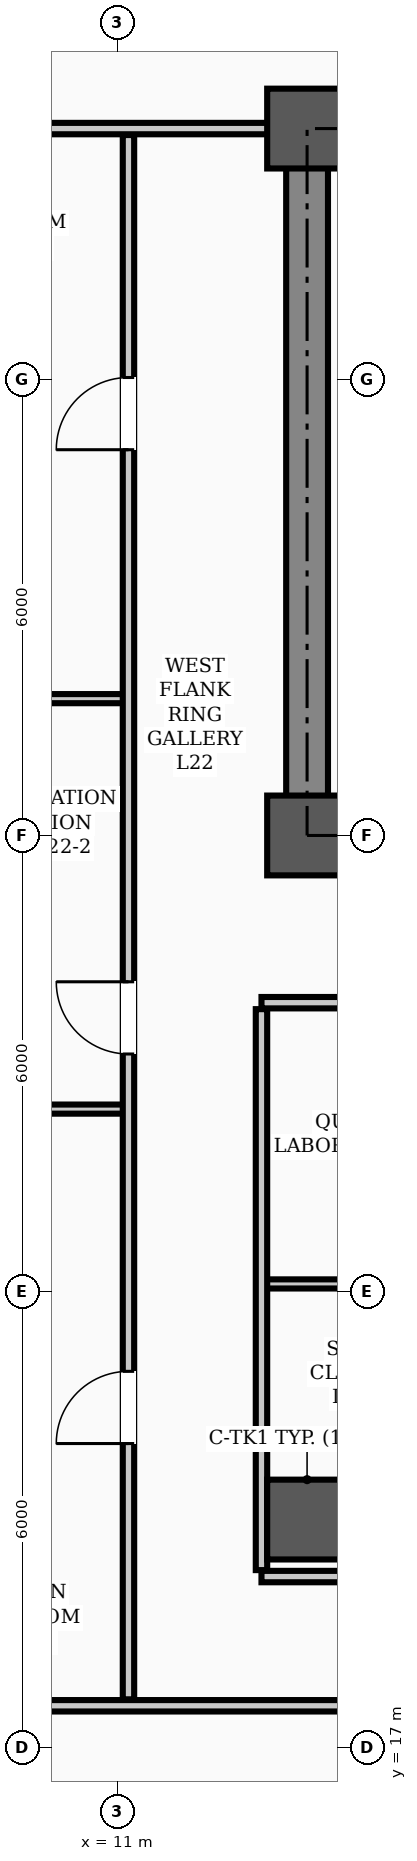
"""IFC4 building model, lengths in metres.
Left out: names, types, materials, properties, quantities, classifications, styles, units other than length and angle.
Written with IfcOpenShell. Run it as: python <this file> out.ifc"""

import sys

from ifc_helpers import new_model, si_unit, direction, frame, frame_2d, origin, origin_2d, place, context, subcontext, project, spatial, rectangle, hollow_rectangle, extrude, element, fill, save


model = new_model("IFC4")
c1 = context("Model", 3, precision=1e-05, world=origin(), true_north=direction((0.0, 1.0)))
c2 = subcontext(c1, "Body", "Model", "MODEL_VIEW")
j1 = project(units=[si_unit("LENGTHUNIT", "METRE"), si_unit("PLANEANGLEUNIT", "RADIAN")], contexts=[c1])
p1 = place(None, origin())
s1 = spatial("IfcSite", under=j1, at=p1, CompositionType="ELEMENT")
p2 = place(p1, origin())
s2 = spatial("IfcBuilding", under=s1, at=p2, CompositionType="ELEMENT")
p3 = place(p2, frame((0.0, 0.0, 88.9)))
s3 = spatial("IfcBuildingStorey", under=s2, at=p3, CompositionType="ELEMENT", Elevation=88.9)
for number, where, z_axis, x_axis in (
    (1, (13.5, 29.0, 0.0), (0.0, 0.0, 1.0), (1.0, 0.0, 0.0)),
    (2, (13.5, 38.3, 0.0), (0.0, 0.0, 1.0), (1.0, 0.0, 0.0)),
    (3, (13.5, 20.0, 0.0), (0.0, 0.0, 1.0), (1.0, 0.0, 0.0)),
):
    element("IfcColumn", number, at=place(p3, frame(where, z_axis=z_axis, x_axis=x_axis)), inside=s3, PredefinedType="COLUMN", context=c2, shape_type="SweptSolid", body=[
        extrude(hollow_rectangle(XDim=1.05, YDim=1.05, WallThickness=0.038, InnerFilletRadius=0.019, OuterFilletRadius=0.057, at=origin_2d()), origin(), (0.0, 0.0, 1.0), 3.9),
    ])
p4 = place(p3, frame((13.5, 29.0, 0.0), z_axis=(0.0, 0.0, 1.0), x_axis=(1.0, 0.0, 0.0)))
e4 = element("IfcWall", 4, at=p4, inside=s3, PredefinedType="SHEAR", context=c2, shape_type="SweptSolid", body=[
    extrude(rectangle(XDim=30.5, YDim=0.55, at=frame_2d((15.25, 0.0))), origin(), (0.0, 0.0, 1.0), 3.72),
])
p5 = place(p4, frame((1.75, 0.0, 0.0)))
e5 = element("IfcOpeningElement", 5, at=p5, cuts=e4, PredefinedType="OPENING", context=c2, shape_type="SweptSolid", body=[
    extrude(rectangle(XDim=1.1, YDim=2.08, at=frame_2d((0.55, 1.04))), frame((0.0, 0.285, 0.0), z_axis=(0.0, -1.0, 0.0), x_axis=(1.0, 0.0, 0.0)), (0.0, 0.0, 1.0), 0.57),
])
p6 = place(p4, frame((26.7, 0.0, 0.0)))
e6 = element("IfcOpeningElement", 6, at=p6, cuts=e4, PredefinedType="OPENING", context=c2, shape_type="SweptSolid", body=[
    extrude(rectangle(XDim=1.1, YDim=2.08, at=frame_2d((0.55, 1.04))), frame((0.0, 0.285, 0.0), z_axis=(0.0, -1.0, 0.0), x_axis=(1.0, 0.0, 0.0)), (0.0, 0.0, 1.0), 0.57),
])
p7 = place(p4, frame((6.8, 0.0, 0.0)))
e7 = element("IfcOpeningElement", 7, at=p7, cuts=e4, PredefinedType="OPENING", context=c2, shape_type="SweptSolid", body=[
    extrude(rectangle(XDim=1.1, YDim=2.08, at=frame_2d((0.55, 1.04))), frame((0.0, 0.285, 0.0), z_axis=(0.0, -1.0, 0.0), x_axis=(1.0, 0.0, 0.0)), (0.0, 0.0, 1.0), 0.57),
])
p8 = place(p4, frame((13.2, 0.0, 0.0)))
e8 = element("IfcOpeningElement", 8, at=p8, cuts=e4, PredefinedType="OPENING", context=c2, shape_type="SweptSolid", body=[
    extrude(rectangle(XDim=1.6, YDim=2.08, at=frame_2d((0.8, 1.04))), frame((0.0, 0.285, 0.0), z_axis=(0.0, -1.0, 0.0), x_axis=(1.0, 0.0, 0.0)), (0.0, 0.0, 1.0), 0.57),
])
p9 = place(p4, frame((20.525, 0.0, 0.0)))
e9 = element("IfcOpeningElement", 9, at=p9, cuts=e4, PredefinedType="OPENING", context=c2, shape_type="SweptSolid", body=[
    extrude(rectangle(XDim=0.95, YDim=2.08, at=frame_2d((0.475, 1.04))), frame((0.0, 0.285, 0.0), z_axis=(0.0, -1.0, 0.0), x_axis=(1.0, 0.0, 0.0)), (0.0, 0.0, 1.0), 0.57),
])
p10 = place(p3, frame((13.5, 38.3, 0.0), z_axis=(0.0, 0.0, 1.0), x_axis=(1.0, 0.0, 0.0)))
e10 = element("IfcWall", 10, at=p10, inside=s3, PredefinedType="SHEAR", context=c2, shape_type="SweptSolid", body=[
    extrude(rectangle(XDim=30.5, YDim=0.55, at=frame_2d((15.25, 0.0))), origin(), (0.0, 0.0, 1.0), 3.72),
])
p11 = place(p3, frame((13.5, 29.35, 0.0), z_axis=(0.0, 0.0, 1.0), x_axis=(0.0, 1.0, 0.0)))
e11 = element("IfcWall", 11, at=p11, inside=s3, PredefinedType="SHEAR", context=c2, shape_type="SweptSolid", body=[
    extrude(rectangle(XDim=8.6, YDim=0.55, at=frame_2d((4.3, 0.0))), origin(), (0.0, 0.0, 1.0), 3.72),
])
p12 = place(p3, frame((12.9, 26.8, 0.0), z_axis=(0.0, 0.0, 1.0), x_axis=(1.0, 0.0, 0.0)))
e12 = element("IfcWall", 12, at=p12, inside=s3, PredefinedType="PARTITIONING", context=c2, shape_type="SweptSolid", body=[
    extrude(rectangle(XDim=31.7, YDim=0.15, at=frame_2d((15.85, 0.0))), origin(), (0.0, 0.0, 1.0), 3.1),
])
p13 = place(p12, frame((13.6, 0.0, 0.0)))
e13 = element("IfcOpeningElement", 13, at=p13, cuts=e12, PredefinedType="OPENING", context=c2, shape_type="SweptSolid", body=[
    extrude(rectangle(XDim=1.6, YDim=2.08, at=frame_2d((0.8, 1.04))), frame((0.0, 0.085, 0.0), z_axis=(0.0, -1.0, 0.0), x_axis=(1.0, 0.0, 0.0)), (0.0, 0.0, 1.0), 0.17),
])
p14 = place(p12, frame((3.275, 0.0, 0.0)))
e14 = element("IfcOpeningElement", 14, at=p14, cuts=e12, PredefinedType="OPENING", context=c2, shape_type="SweptSolid", body=[
    extrude(rectangle(XDim=0.95, YDim=2.08, at=frame_2d((0.475, 1.04))), frame((0.0, 0.085, 0.0), z_axis=(0.0, -1.0, 0.0), x_axis=(1.0, 0.0, 0.0)), (0.0, 0.0, 1.0), 0.17),
])
p15 = place(p12, frame((9.025, 0.0, 0.0)))
e15 = element("IfcOpeningElement", 15, at=p15, cuts=e12, PredefinedType="OPENING", context=c2, shape_type="SweptSolid", body=[
    extrude(rectangle(XDim=0.95, YDim=2.08, at=frame_2d((0.475, 1.04))), frame((0.0, 0.085, 0.0), z_axis=(0.0, -1.0, 0.0), x_axis=(1.0, 0.0, 0.0)), (0.0, 0.0, 1.0), 0.17),
])
p16 = place(p12, frame((19.525, 0.0, 0.0)))
e16 = element("IfcOpeningElement", 16, at=p16, cuts=e12, PredefinedType="OPENING", context=c2, shape_type="SweptSolid", body=[
    extrude(rectangle(XDim=0.95, YDim=2.08, at=frame_2d((0.475, 1.04))), frame((0.0, 0.085, 0.0), z_axis=(0.0, -1.0, 0.0), x_axis=(1.0, 0.0, 0.0)), (0.0, 0.0, 1.0), 0.17),
])
p17 = place(p12, frame((26.725, 0.0, 0.0)))
e17 = element("IfcOpeningElement", 17, at=p17, cuts=e12, PredefinedType="OPENING", context=c2, shape_type="SweptSolid", body=[
    extrude(rectangle(XDim=0.95, YDim=2.08, at=frame_2d((0.475, 1.04))), frame((0.0, 0.085, 0.0), z_axis=(0.0, -1.0, 0.0), x_axis=(1.0, 0.0, 0.0)), (0.0, 0.0, 1.0), 0.17),
])
p18 = place(p3, frame((7.81, 17.55, 0.0), z_axis=(0.0, 0.0, 1.0), x_axis=(1.0, 0.0, 0.0)))
e18 = element("IfcWall", 18, at=p18, inside=s3, PredefinedType="PARTITIONING", context=c2, shape_type="SweptSolid", body=[
    extrude(rectangle(XDim=49.38, YDim=0.15, at=frame_2d((24.69, 0.0))), origin(), (0.0, 0.0, 1.0), 3.1),
])
p19 = place(p18, frame((7.465, 0.0, 0.0)))
e19 = element("IfcOpeningElement", 19, at=p19, cuts=e18, PredefinedType="OPENING", context=c2, shape_type="SweptSolid", body=[
    extrude(rectangle(XDim=0.95, YDim=2.08, at=frame_2d((0.475, 1.04))), frame((0.0, 0.085, 0.0), z_axis=(0.0, -1.0, 0.0), x_axis=(1.0, 0.0, 0.0)), (0.0, 0.0, 1.0), 0.17),
])
p20 = place(p18, frame((11.915, 0.0, 0.0)))
e20 = element("IfcOpeningElement", 20, at=p20, cuts=e18, PredefinedType="OPENING", context=c2, shape_type="SweptSolid", body=[
    extrude(rectangle(XDim=0.95, YDim=2.08, at=frame_2d((0.475, 1.04))), frame((0.0, 0.085, 0.0), z_axis=(0.0, -1.0, 0.0), x_axis=(1.0, 0.0, 0.0)), (0.0, 0.0, 1.0), 0.17),
])
p21 = place(p18, frame((18.915, 0.0, 0.0)))
e21 = element("IfcOpeningElement", 21, at=p21, cuts=e18, PredefinedType="OPENING", context=c2, shape_type="SweptSolid", body=[
    extrude(rectangle(XDim=0.95, YDim=2.08, at=frame_2d((0.475, 1.04))), frame((0.0, 0.085, 0.0), z_axis=(0.0, -1.0, 0.0), x_axis=(1.0, 0.0, 0.0)), (0.0, 0.0, 1.0), 0.17),
])
p22 = place(p18, frame((26.015, 0.0, 0.0)))
e22 = element("IfcOpeningElement", 22, at=p22, cuts=e18, PredefinedType="OPENING", context=c2, shape_type="SweptSolid", body=[
    extrude(rectangle(XDim=0.95, YDim=2.08, at=frame_2d((0.475, 1.04))), frame((0.0, 0.085, 0.0), z_axis=(0.0, -1.0, 0.0), x_axis=(1.0, 0.0, 0.0)), (0.0, 0.0, 1.0), 0.17),
])
p23 = place(p18, frame((32.815, 0.0, 0.0)))
e23 = element("IfcOpeningElement", 23, at=p23, cuts=e18, PredefinedType="OPENING", context=c2, shape_type="SweptSolid", body=[
    extrude(rectangle(XDim=0.95, YDim=2.08, at=frame_2d((0.475, 1.04))), frame((0.0, 0.085, 0.0), z_axis=(0.0, -1.0, 0.0), x_axis=(1.0, 0.0, 0.0)), (0.0, 0.0, 1.0), 0.17),
])
p24 = place(p18, frame((37.09, 0.0, 0.0)))
e24 = element("IfcOpeningElement", 24, at=p24, cuts=e18, PredefinedType="OPENING", context=c2, shape_type="SweptSolid", body=[
    extrude(rectangle(XDim=0.95, YDim=2.08, at=frame_2d((0.475, 1.04))), frame((0.0, 0.085, 0.0), z_axis=(0.0, -1.0, 0.0), x_axis=(1.0, 0.0, 0.0)), (0.0, 0.0, 1.0), 0.17),
])
p25 = place(p3, frame((12.9, 19.25, 0.0), z_axis=(0.0, 0.0, 1.0), x_axis=(1.0, 0.0, 0.0)))
e25 = element("IfcWall", 25, at=p25, inside=s3, PredefinedType="PARTITIONING", context=c2, shape_type="SweptSolid", body=[
    extrude(rectangle(XDim=13.3, YDim=0.15, at=frame_2d((6.65, 0.0))), origin(), (0.0, 0.0, 1.0), 3.1),
])
p26 = place(p25, frame((3.275, 0.0, 0.0)))
e26 = element("IfcOpeningElement", 26, at=p26, cuts=e25, PredefinedType="OPENING", context=c2, shape_type="SweptSolid", body=[
    extrude(rectangle(XDim=0.95, YDim=2.08, at=frame_2d((0.475, 1.04))), frame((0.0, 0.085, 0.0), z_axis=(0.0, -1.0, 0.0), x_axis=(1.0, 0.0, 0.0)), (0.0, 0.0, 1.0), 0.17),
])
p27 = place(p25, frame((9.025, 0.0, 0.0)))
e27 = element("IfcOpeningElement", 27, at=p27, cuts=e25, PredefinedType="OPENING", context=c2, shape_type="SweptSolid", body=[
    extrude(rectangle(XDim=0.95, YDim=2.08, at=frame_2d((0.475, 1.04))), frame((0.0, 0.085, 0.0), z_axis=(0.0, -1.0, 0.0), x_axis=(1.0, 0.0, 0.0)), (0.0, 0.0, 1.0), 0.17),
])
p28 = place(p3, frame((7.81, 38.3, 0.0), z_axis=(0.0, 0.0, 1.0), x_axis=(1.0, 0.0, 0.0)))
e28 = element("IfcWall", 28, at=p28, inside=s3, PredefinedType="PARTITIONING", context=c2, shape_type="SweptSolid", body=[
    extrude(rectangle(XDim=5.69, YDim=0.15, at=frame_2d((2.845, 0.0))), origin(), (0.0, 0.0, 1.0), 3.0),
])
p29 = place(p3, frame((12.9, 23.1, 0.0), z_axis=(0.0, 0.0, 1.0), x_axis=(1.0, 0.0, 0.0)))
e29 = element("IfcWall", 29, at=p29, inside=s3, PredefinedType="PARTITIONING", context=c2, shape_type="SweptSolid", body=[
    extrude(rectangle(XDim=7.5, YDim=0.12, at=frame_2d((3.75, 0.0))), origin(), (0.0, 0.0, 1.0), 3.1),
])
for number, where, z_axis, x_axis in (
    (30, (7.81, 25.4, 0.0), (0.0, 0.0, 1.0), (1.0, 0.0, 0.0)),
    (31, (7.81, 30.8, 0.0), (0.0, 0.0, 1.0), (1.0, 0.0, 0.0)),
):
    element("IfcWall", number, at=place(p3, frame(where, z_axis=z_axis, x_axis=x_axis)), inside=s3, PredefinedType="PARTITIONING", context=c2, shape_type="SweptSolid", body=[
        extrude(rectangle(XDim=3.34, YDim=0.12, at=frame_2d((1.67, 0.0))), origin(), (0.0, 0.0, 1.0), 3.212),
    ])
p30 = place(p3, frame((11.15, 17.635, 0.0), z_axis=(0.0, 0.0, 1.0), x_axis=(0.0, 1.0, 0.0)))
e32 = element("IfcWall", 32, at=p30, inside=s3, PredefinedType="PARTITIONING", context=c2, shape_type="SweptSolid", body=[
    extrude(rectangle(XDim=20.58, YDim=0.15, at=frame_2d((10.29, 0.0))), origin(), (0.0, 0.0, 1.0), 3.0),
])
p31 = place(p30, frame((3.365, 0.0, 0.0)))
e33 = element("IfcOpeningElement", 33, at=p31, cuts=e32, PredefinedType="OPENING", context=c2, shape_type="SweptSolid", body=[
    extrude(rectangle(XDim=0.95, YDim=2.08, at=frame_2d((0.475, 1.04))), frame((0.0, 0.085, 0.0), z_axis=(0.0, -1.0, 0.0), x_axis=(1.0, 0.0, 0.0)), (0.0, 0.0, 1.0), 0.17),
])
p32 = place(p30, frame((8.49, 0.0, 0.0)))
e34 = element("IfcOpeningElement", 34, at=p32, cuts=e32, PredefinedType="OPENING", context=c2, shape_type="SweptSolid", body=[
    extrude(rectangle(XDim=0.95, YDim=2.08, at=frame_2d((0.475, 1.04))), frame((0.0, 0.085, 0.0), z_axis=(0.0, -1.0, 0.0), x_axis=(1.0, 0.0, 0.0)), (0.0, 0.0, 1.0), 0.17),
])
p33 = place(p30, frame((16.44, 0.0, 0.0)))
e35 = element("IfcOpeningElement", 35, at=p33, cuts=e32, PredefinedType="OPENING", context=c2, shape_type="SweptSolid", body=[
    extrude(rectangle(XDim=0.95, YDim=2.08, at=frame_2d((0.475, 1.04))), frame((0.0, 0.085, 0.0), z_axis=(0.0, -1.0, 0.0), x_axis=(1.0, 0.0, 0.0)), (0.0, 0.0, 1.0), 0.17),
])
p34 = place(p3, frame((12.9, 19.335, 0.0), z_axis=(0.0, 0.0, 1.0), x_axis=(0.0, 1.0, 0.0)))
e36 = element("IfcWall", 36, at=p34, inside=s3, PredefinedType="PARTITIONING", context=c2, shape_type="SweptSolid", body=[
    extrude(rectangle(XDim=7.38, YDim=0.15, at=frame_2d((3.69, 0.0))), origin(), (0.0, 0.0, 1.0), 3.0),
])
p35 = place(p31, origin())
e37 = element("IfcDoor", 37, at=p35, inside=s3, OperationType="SINGLE_SWING_LEFT", PredefinedType="DOOR", context=c2, shape_type="SweptSolid", body=[
    extrude(rectangle(XDim=0.95, YDim=2.08, at=frame_2d((0.475, 1.04))), frame((0.0, 0.025, 0.0), z_axis=(0.0, -1.0, 0.0), x_axis=(1.0, 0.0, 0.0)), (0.0, 0.0, 1.0), 0.05),
])
fill(e33, e37)
p36 = place(p32, origin())
e38 = element("IfcDoor", 38, at=p36, inside=s3, OperationType="SINGLE_SWING_RIGHT", PredefinedType="DOOR", context=c2, shape_type="SweptSolid", body=[
    extrude(rectangle(XDim=0.95, YDim=2.08, at=frame_2d((0.475, 1.04))), frame((0.0, 0.025, 0.0), z_axis=(0.0, -1.0, 0.0), x_axis=(1.0, 0.0, 0.0)), (0.0, 0.0, 1.0), 0.05),
])
fill(e34, e38)
p37 = place(p33, origin())
e39 = element("IfcDoor", 39, at=p37, inside=s3, OperationType="SINGLE_SWING_LEFT", PredefinedType="DOOR", context=c2, shape_type="SweptSolid", body=[
    extrude(rectangle(XDim=0.95, YDim=2.08, at=frame_2d((0.475, 1.04))), frame((0.0, 0.025, 0.0), z_axis=(0.0, -1.0, 0.0), x_axis=(1.0, 0.0, 0.0)), (0.0, 0.0, 1.0), 0.05),
])
fill(e35, e39)
save(model, sys.argv[1])
